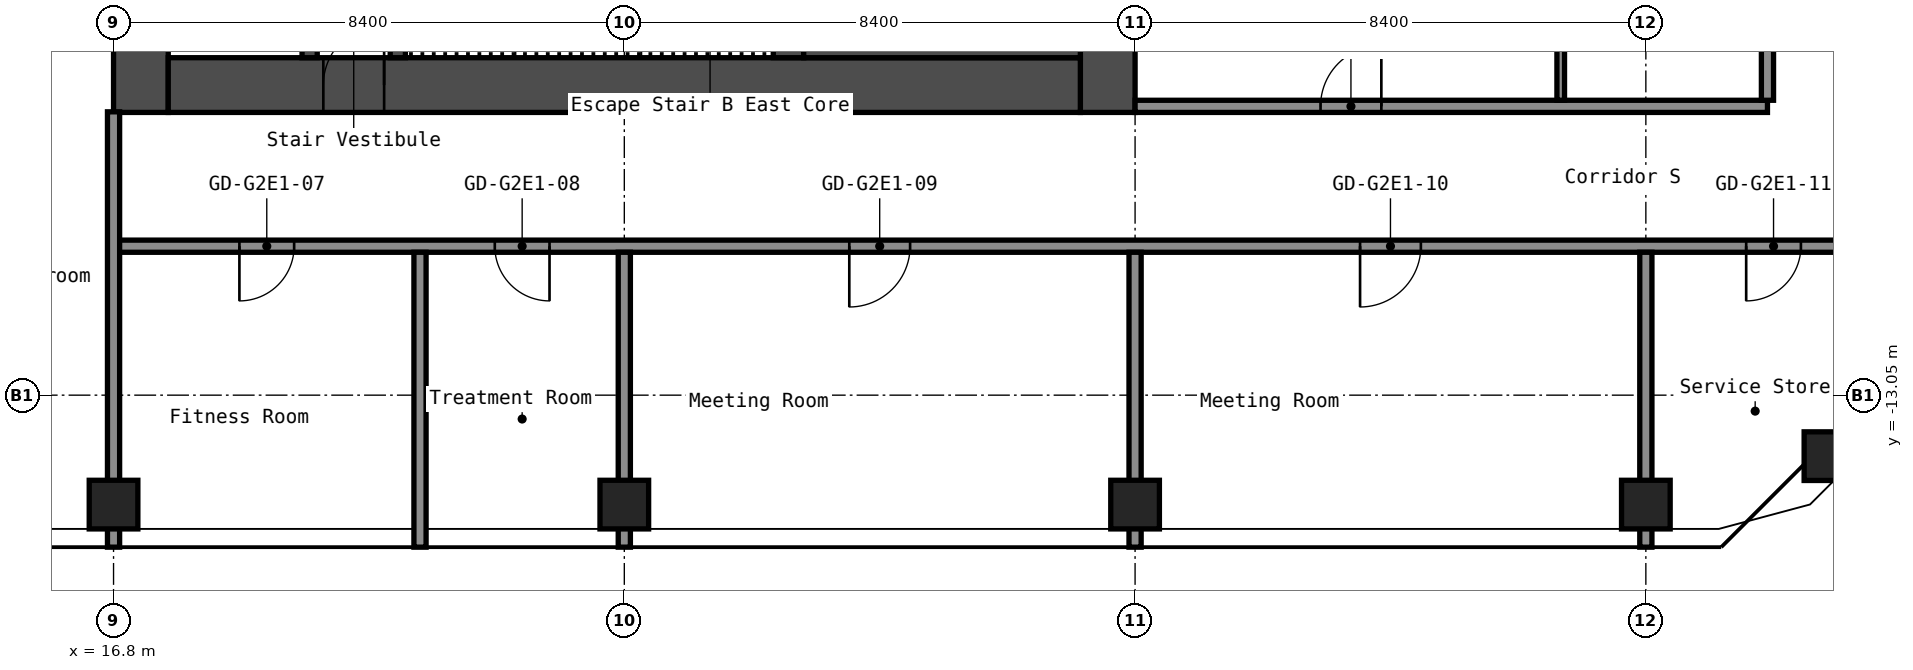
"""IFC4 building model, lengths in metres.
Left out: names, types, materials, properties, quantities, classifications, styles, units other than length and angle.
Written with IfcOpenShell. Run it as: python <this file> out.ifc"""

import sys

from ifc_helpers import new_model, si_unit, direction, frame, frame_2d, origin, origin_2d, place, context, subcontext, project, spatial, rectangle, hollow_rectangle, extrude, element, fill, save


model = new_model("IFC4")
c1 = context("Model", 3, precision=1e-05, world=origin(), true_north=direction((0.0, 1.0)))
c2 = subcontext(c1, "Body", "Model", "MODEL_VIEW")
j1 = project(units=[si_unit("LENGTHUNIT", "METRE"), si_unit("PLANEANGLEUNIT", "RADIAN")], contexts=[c1])
p1 = place(None, origin())
s1 = spatial("IfcSite", under=j1, at=p1, CompositionType="ELEMENT")
p2 = place(p1, origin())
s2 = spatial("IfcBuilding", under=s1, at=p2, CompositionType="ELEMENT")
p3 = place(p2, frame((0.0, 0.0, 104.2)))
s3 = spatial("IfcBuildingStorey", under=s2, at=p3, CompositionType="ELEMENT", Elevation=104.2)
for number, where, z_axis, x_axis in (
    (1, (16.8, -14.85, 0.0), (0.0, 0.0, 1.0), (1.0, 0.0, 0.0)),
    (2, (25.2, -14.85, 0.0), (0.0, 0.0, 1.0), (1.0, 0.0, 0.0)),
    (3, (33.6, -14.85, 0.0), (0.0, 0.0, 1.0), (1.0, 0.0, 0.0)),
    (4, (42.0, -14.85, 0.0), (0.0, 0.0, 1.0), (1.0, 0.0, 0.0)),
    (5, (45.003, -14.053, 0.0), (0.0, 0.0, 1.0), (1.0, 0.0, 0.0)),
):
    element("IfcColumn", number, at=place(p3, frame(where, z_axis=z_axis, x_axis=x_axis)), inside=s3, PredefinedType="COLUMN", context=c2, shape_type="SweptSolid", body=[
        extrude(hollow_rectangle(XDim=0.8, YDim=0.8, WallThickness=0.032, at=origin_2d()), origin(), (0.0, 0.0, 1.0), 2.8),
    ])
p4 = place(p3, frame((17.25, -8.4, 0.0), z_axis=(0.0, 0.0, 1.0), x_axis=(0.0, 1.0, 0.0)))
e6 = element("IfcWall", 6, at=p4, inside=s3, PredefinedType="SHEAR", context=c2, shape_type="SweptSolid", body=[
    extrude(rectangle(XDim=16.8, YDim=0.9, at=frame_2d((8.4, 0.0))), origin(), (0.0, 0.0, 1.0), 2.8),
])
p5 = place(p4, frame((7.6, 0.0, 0.0)))
e7 = element("IfcOpeningElement", 7, at=p5, cuts=e6, PredefinedType="OPENING", context=c2, shape_type="SweptSolid", body=[
    extrude(rectangle(XDim=1.2, YDim=2.1, at=frame_2d((0.6, 1.05))), frame((0.0, 0.46, 0.0), z_axis=(0.0, -1.0, 0.0), x_axis=(1.0, 0.0, 0.0)), (0.0, 0.0, 1.0), 0.92),
])
p6 = place(p3, frame((33.15, -8.4, 0.0), z_axis=(0.0, 0.0, 1.0), x_axis=(0.0, 1.0, 0.0)))
e8 = element("IfcWall", 8, at=p6, inside=s3, PredefinedType="SHEAR", context=c2, shape_type="SweptSolid", body=[
    extrude(rectangle(XDim=16.8, YDim=0.9, at=frame_2d((8.4, 0.0))), origin(), (0.0, 0.0, 1.0), 2.8),
])
p7 = place(p3, frame((17.7, -7.95, 0.0), z_axis=(0.0, 0.0, 1.0), x_axis=(1.0, 0.0, 0.0)))
e9 = element("IfcWall", 9, at=p7, inside=s3, PredefinedType="SHEAR", context=c2, shape_type="SweptSolid", body=[
    extrude(rectangle(XDim=15.0, YDim=0.9, at=frame_2d((7.5, 0.0))), origin(), (0.0, 0.0, 1.0), 2.8),
])
p8 = place(p7, frame((2.55, 0.0, 0.0)))
e10 = element("IfcOpeningElement", 10, at=p8, cuts=e9, PredefinedType="OPENING", context=c2, shape_type="SweptSolid", body=[
    extrude(rectangle(XDim=1.0, YDim=2.1, at=frame_2d((0.5, 1.05))), frame((0.0, 0.46, 0.0), z_axis=(0.0, -1.0, 0.0), x_axis=(1.0, 0.0, 0.0)), (0.0, 0.0, 1.0), 0.92),
])
p9 = place(p3, frame((20.025, -7.5, 0.0), z_axis=(0.0, 0.0, 1.0), x_axis=(0.0, 1.0, 0.0)))
e11 = element("IfcWall", 11, at=p9, inside=s3, PredefinedType="SHEAR", context=c2, shape_type="SweptSolid", body=[
    extrude(rectangle(XDim=6.3, YDim=0.25, at=frame_2d((3.15, 0.0))), origin(), (0.0, 0.0, 1.0), 2.8),
])
p10 = place(p9, frame((2.4, 0.0, 0.0)))
e12 = element("IfcOpeningElement", 12, at=p10, cuts=e11, PredefinedType="OPENING", context=c2, shape_type="SweptSolid", body=[
    extrude(rectangle(XDim=1.0, YDim=2.1, at=frame_2d((0.5, 1.05))), frame((0.0, 0.135, 0.0), z_axis=(0.0, -1.0, 0.0), x_axis=(1.0, 0.0, 0.0)), (0.0, 0.0, 1.0), 0.27),
])
p11 = place(p3, frame((21.475, -7.5, 0.0), z_axis=(0.0, 0.0, 1.0), x_axis=(0.0, 1.0, 0.0)))
e13 = element("IfcWall", 13, at=p11, inside=s3, PredefinedType="SHEAR", context=c2, shape_type="SweptSolid", body=[
    extrude(rectangle(XDim=3.75, YDim=0.25, at=frame_2d((1.875, 0.0))), origin(), (0.0, 0.0, 1.0), 2.8),
])
p12 = place(p11, frame((1.3, 0.0, 0.0)))
e14 = element("IfcOpeningElement", 14, at=p12, cuts=e13, PredefinedType="OPENING", context=c2, shape_type="SweptSolid", body=[
    extrude(rectangle(XDim=1.2, YDim=2.1, at=frame_2d((0.6, 1.05))), frame((0.0, 0.135, 0.0), z_axis=(0.0, -1.0, 0.0), x_axis=(1.0, 0.0, 0.0)), (0.0, 0.0, 1.0), 0.27),
])
p13 = place(p3, frame((27.9, -7.5, 0.0), z_axis=(0.0, 0.0, 1.0), x_axis=(0.0, 1.0, 0.0)))
e15 = element("IfcWall", 15, at=p13, inside=s3, PredefinedType="SHEAR", context=c2, shape_type="SweptSolid", body=[
    extrude(rectangle(XDim=3.75, YDim=0.5, at=frame_2d((1.875, 0.0))), origin(), (0.0, 0.0, 1.0), 2.8),
])
p14 = place(p3, frame((28.15, -6.75, 0.0), z_axis=(0.0, 0.0, 1.0), x_axis=(1.0, 0.0, 0.0)))
e16 = element("IfcWall", 16, at=p14, inside=s3, PredefinedType="SHEAR", context=c2, shape_type="SweptSolid", body=[
    extrude(rectangle(XDim=4.55, YDim=1.5, at=frame_2d((2.275, 0.0))), origin(), (0.0, 0.0, 1.0), 2.8),
])
p15 = place(p3, frame((16.8, -10.6, 0.0), z_axis=(0.0, 0.0, 1.0), x_axis=(1.0, 0.0, 0.0)))
e17 = element("IfcWall", 17, at=p15, inside=s3, PredefinedType="PARTITIONING", context=c2, shape_type="SweptSolid", body=[
    extrude(rectangle(XDim=29.7, YDim=0.2, at=frame_2d((14.85, 0.0))), origin(), (0.0, 0.0, 1.0), 2.8),
])
p16 = place(p15, frame((2.07, 0.0, 0.0)))
e18 = element("IfcOpeningElement", 18, at=p16, cuts=e17, PredefinedType="OPENING", context=c2, shape_type="SweptSolid", body=[
    extrude(rectangle(XDim=0.9, YDim=2.1, at=frame_2d((0.45, 1.05))), frame((0.0, 0.11, 0.0), z_axis=(0.0, -1.0, 0.0), x_axis=(1.0, 0.0, 0.0)), (0.0, 0.0, 1.0), 0.22),
])
p17 = place(p15, frame((6.27, 0.0, 0.0)))
e19 = element("IfcOpeningElement", 19, at=p17, cuts=e17, PredefinedType="OPENING", context=c2, shape_type="SweptSolid", body=[
    extrude(rectangle(XDim=0.9, YDim=2.1, at=frame_2d((0.45, 1.05))), frame((0.0, 0.11, 0.0), z_axis=(0.0, -1.0, 0.0), x_axis=(1.0, 0.0, 0.0)), (0.0, 0.0, 1.0), 0.22),
])
p18 = place(p15, frame((12.1, 0.0, 0.0)))
e20 = element("IfcOpeningElement", 20, at=p18, cuts=e17, PredefinedType="OPENING", context=c2, shape_type="SweptSolid", body=[
    extrude(rectangle(XDim=1.0, YDim=2.1, at=frame_2d((0.5, 1.05))), frame((0.0, 0.11, 0.0), z_axis=(0.0, -1.0, 0.0), x_axis=(1.0, 0.0, 0.0)), (0.0, 0.0, 1.0), 0.22),
])
p19 = place(p15, frame((20.5, 0.0, 0.0)))
e21 = element("IfcOpeningElement", 21, at=p19, cuts=e17, PredefinedType="OPENING", context=c2, shape_type="SweptSolid", body=[
    extrude(rectangle(XDim=1.0, YDim=2.1, at=frame_2d((0.5, 1.05))), frame((0.0, 0.11, 0.0), z_axis=(0.0, -1.0, 0.0), x_axis=(1.0, 0.0, 0.0)), (0.0, 0.0, 1.0), 0.22),
])
p20 = place(p15, frame((26.85, 0.0, 0.0)))
e22 = element("IfcOpeningElement", 22, at=p20, cuts=e17, PredefinedType="OPENING", context=c2, shape_type="SweptSolid", body=[
    extrude(rectangle(XDim=0.9, YDim=2.1, at=frame_2d((0.45, 1.05))), frame((0.0, 0.11, 0.0), z_axis=(0.0, -1.0, 0.0), x_axis=(1.0, 0.0, 0.0)), (0.0, 0.0, 1.0), 0.22),
])
p21 = place(p3, frame((33.6, -8.3, 0.0), z_axis=(0.0, 0.0, 1.0), x_axis=(1.0, 0.0, 0.0)))
e23 = element("IfcWall", 23, at=p21, inside=s3, PredefinedType="PARTITIONING", context=c2, shape_type="SweptSolid", body=[
    extrude(rectangle(XDim=10.4, YDim=0.2, at=frame_2d((5.2, 0.0))), origin(), (0.0, 0.0, 1.0), 2.8),
])
p22 = place(p21, frame((3.05, 0.0, 0.0)))
e24 = element("IfcOpeningElement", 24, at=p22, cuts=e23, PredefinedType="OPENING", context=c2, shape_type="SweptSolid", body=[
    extrude(rectangle(XDim=1.0, YDim=2.1, at=frame_2d((0.5, 1.05))), frame((0.0, 0.11, 0.0), z_axis=(0.0, -1.0, 0.0), x_axis=(1.0, 0.0, 0.0)), (0.0, 0.0, 1.0), 0.22),
])
p23 = place(p3, frame((16.8, -15.55, 0.0), z_axis=(0.0, 0.0, 1.0), x_axis=(0.0, 1.0, 0.0)))
e25 = element("IfcWall", 25, at=p23, inside=s3, PredefinedType="PARTITIONING", context=c2, shape_type="SweptSolid", body=[
    extrude(rectangle(XDim=7.16, YDim=0.2, at=frame_2d((3.58, 0.0))), origin(), (0.0, 0.0, 1.0), 2.8),
])
for number, where, z_axis, x_axis in (
    (26, (21.84, -15.55, 0.0), (0.0, 0.0, 1.0), (0.0, 1.0, 0.0)),
    (27, (25.2, -15.55, 0.0), (0.0, 0.0, 1.0), (0.0, 1.0, 0.0)),
    (28, (33.6, -15.55, 0.0), (0.0, 0.0, 1.0), (0.0, 1.0, 0.0)),
):
    element("IfcWall", number, at=place(p3, frame(where, z_axis=z_axis, x_axis=x_axis)), inside=s3, PredefinedType="PARTITIONING", context=c2, shape_type="SweptSolid", body=[
        extrude(rectangle(XDim=4.85, YDim=0.2, at=frame_2d((2.425, 0.0))), origin(), (0.0, 0.0, 1.0), 2.8),
    ])
p24 = place(p3, frame((40.6, -8.2, 0.0), z_axis=(0.0, 0.0, 1.0), x_axis=(0.0, 1.0, 0.0)))
e29 = element("IfcWall", 29, at=p24, inside=s3, PredefinedType="PARTITIONING", context=c2, shape_type="SweptSolid", body=[
    extrude(rectangle(XDim=3.3, YDim=0.125, at=frame_2d((1.65, 0.0))), origin(), (0.0, 0.0, 1.0), 2.8),
])
p25 = place(p3, frame((42.0, -15.55, 0.0), z_axis=(0.0, 0.0, 1.0), x_axis=(0.0, 1.0, 0.0)))
e30 = element("IfcWall", 30, at=p25, inside=s3, PredefinedType="PARTITIONING", context=c2, shape_type="SweptSolid", body=[
    extrude(rectangle(XDim=4.85, YDim=0.2, at=frame_2d((2.425, 0.0))), origin(), (0.0, 0.0, 1.0), 2.8),
])
p26 = place(p3, frame((44.0, -8.2, 0.0), z_axis=(0.0, 0.0, 1.0), x_axis=(0.0, 1.0, 0.0)))
e31 = element("IfcWall", 31, at=p26, inside=s3, PredefinedType="PARTITIONING", context=c2, shape_type="SweptSolid", body=[
    extrude(rectangle(XDim=16.4, YDim=0.2, at=frame_2d((8.2, 0.0))), origin(), (0.0, 0.0, 1.0), 2.8),
])
p27 = place(p8, origin())
e32 = element("IfcDoor", 32, at=p27, inside=s3, OperationType="SINGLE_SWING_LEFT", PredefinedType="DOOR", context=c2, shape_type="SweptSolid", body=[
    extrude(rectangle(XDim=1.0, YDim=2.1, at=frame_2d((0.5, 1.05))), frame((0.0, 0.025, 0.0), z_axis=(0.0, -1.0, 0.0), x_axis=(1.0, 0.0, 0.0)), (0.0, 0.0, 1.0), 0.05),
])
fill(e10, e32)
p28 = place(p16, origin())
e33 = element("IfcDoor", 33, at=p28, inside=s3, OperationType="SINGLE_SWING_LEFT", PredefinedType="DOOR", context=c2, shape_type="SweptSolid", body=[
    extrude(rectangle(XDim=0.9, YDim=2.1, at=frame_2d((0.45, 1.05))), frame((0.0, 0.025, 0.0), z_axis=(0.0, -1.0, 0.0), x_axis=(1.0, 0.0, 0.0)), (0.0, 0.0, 1.0), 0.05),
])
fill(e18, e33)
p29 = place(p17, origin())
e34 = element("IfcDoor", 34, at=p29, inside=s3, OperationType="SINGLE_SWING_RIGHT", PredefinedType="DOOR", context=c2, shape_type="SweptSolid", body=[
    extrude(rectangle(XDim=0.9, YDim=2.1, at=frame_2d((0.45, 1.05))), frame((0.0, 0.025, 0.0), z_axis=(0.0, -1.0, 0.0), x_axis=(1.0, 0.0, 0.0)), (0.0, 0.0, 1.0), 0.05),
])
fill(e19, e34)
p30 = place(p18, origin())
e35 = element("IfcDoor", 35, at=p30, inside=s3, OperationType="SINGLE_SWING_LEFT", PredefinedType="DOOR", context=c2, shape_type="SweptSolid", body=[
    extrude(rectangle(XDim=1.0, YDim=2.1, at=frame_2d((0.5, 1.05))), frame((0.0, 0.025, 0.0), z_axis=(0.0, -1.0, 0.0), x_axis=(1.0, 0.0, 0.0)), (0.0, 0.0, 1.0), 0.05),
])
fill(e20, e35)
p31 = place(p19, origin())
e36 = element("IfcDoor", 36, at=p31, inside=s3, OperationType="SINGLE_SWING_LEFT", PredefinedType="DOOR", context=c2, shape_type="SweptSolid", body=[
    extrude(rectangle(XDim=1.0, YDim=2.1, at=frame_2d((0.5, 1.05))), frame((0.0, 0.025, 0.0), z_axis=(0.0, -1.0, 0.0), x_axis=(1.0, 0.0, 0.0)), (0.0, 0.0, 1.0), 0.05),
])
fill(e21, e36)
p32 = place(p20, origin())
e37 = element("IfcDoor", 37, at=p32, inside=s3, OperationType="SINGLE_SWING_LEFT", PredefinedType="DOOR", context=c2, shape_type="SweptSolid", body=[
    extrude(rectangle(XDim=0.9, YDim=2.1, at=frame_2d((0.45, 1.05))), frame((0.0, 0.025, 0.0), z_axis=(0.0, -1.0, 0.0), x_axis=(1.0, 0.0, 0.0)), (0.0, 0.0, 1.0), 0.05),
])
fill(e22, e37)
p33 = place(p22, origin())
e38 = element("IfcDoor", 38, at=p33, inside=s3, OperationType="SINGLE_SWING_LEFT", PredefinedType="DOOR", context=c2, shape_type="SweptSolid", body=[
    extrude(rectangle(XDim=1.0, YDim=2.1, at=frame_2d((0.5, 1.05))), frame((0.0, 0.025, 0.0), z_axis=(0.0, -1.0, 0.0), x_axis=(1.0, 0.0, 0.0)), (0.0, 0.0, 1.0), 0.05),
])
fill(e24, e38)
save(model, sys.argv[1])
